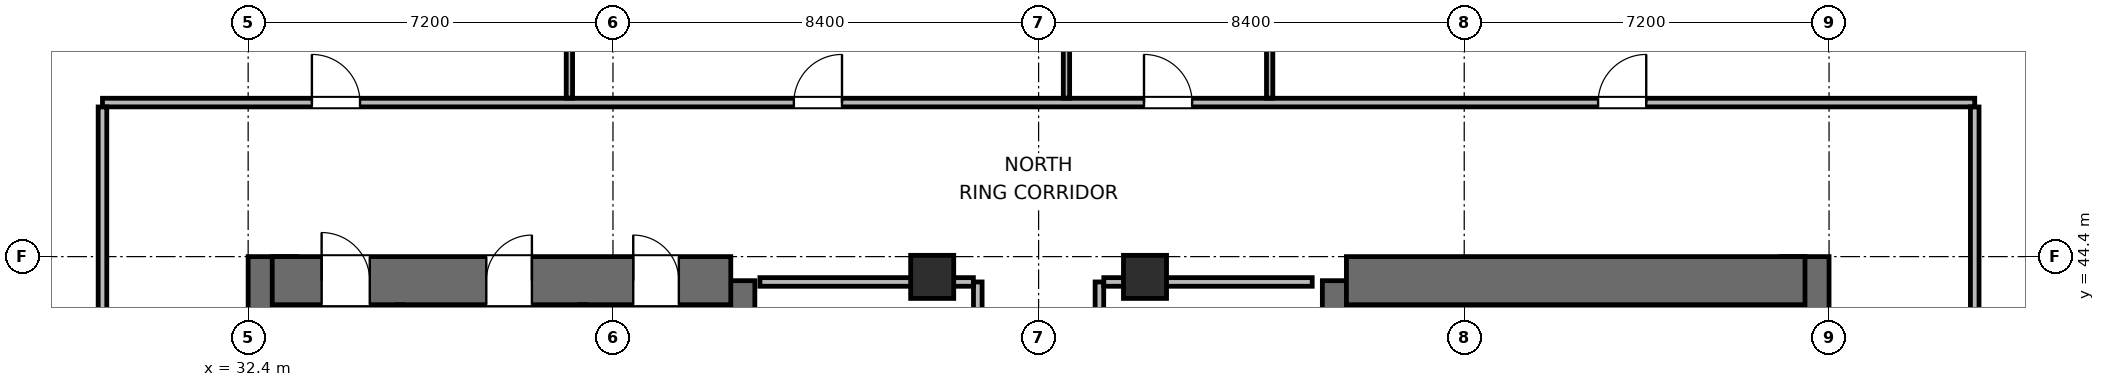
"""IFC4 building model, lengths in metres.
Left out: names, types, materials, properties, quantities, classifications, styles, units other than length and angle.
Written with IfcOpenShell. Run it as: python <this file> out.ifc"""

import sys

from ifc_helpers import new_model, si_unit, direction, frame, frame_2d, origin, origin_2d, place, context, subcontext, project, spatial, rectangle, extrude, element, fill, save


model = new_model("IFC4")
c1 = context("Model", 3, precision=1e-05, world=origin(), true_north=direction((0.0, 1.0)))
c2 = subcontext(c1, "Body", "Model", "MODEL_VIEW")
j1 = project(units=[si_unit("LENGTHUNIT", "METRE"), si_unit("PLANEANGLEUNIT", "RADIAN")], contexts=[c1])
p1 = place(None, origin())
s1 = spatial("IfcSite", under=j1, at=p1, CompositionType="ELEMENT")
p2 = place(p1, origin())
s2 = spatial("IfcBuilding", under=s1, at=p2, CompositionType="ELEMENT")
p3 = place(p2, frame((0.0, 0.0, 60.6)))
s3 = spatial("IfcBuildingStorey", under=s2, at=p3, CompositionType="ELEMENT", Elevation=60.6)
p4 = place(p3, frame((32.875, 27.6, 0.0), z_axis=(0.0, 0.0, 1.0), x_axis=(0.0, 1.0, 0.0)))
e1 = element("IfcWall", 1, at=p4, inside=s3, PredefinedType="SHEAR", context=c2, shape_type="SweptSolid", body=[
    extrude(rectangle(XDim=16.8, YDim=0.95, at=frame_2d((8.4, 0.0))), origin(), (0.0, 0.0, 1.0), 3.9),
])
p5 = place(p3, frame((41.925, 37.8, 0.0), z_axis=(0.0, 0.0, 1.0), x_axis=(0.0, 1.0, 0.0)))
e2 = element("IfcWall", 2, at=p5, inside=s3, PredefinedType="SHEAR", context=c2, shape_type="SweptSolid", body=[
    extrude(rectangle(XDim=6.125, YDim=0.95, at=frame_2d((3.062, 0.0))), origin(), (0.0, 0.0, 1.0), 3.9),
])
p6 = place(p3, frame((32.875, 43.925, 0.0), z_axis=(0.0, 0.0, 1.0), x_axis=(1.0, 0.0, 0.0)))
e3 = element("IfcWall", 3, at=p6, inside=s3, PredefinedType="SHEAR", context=c2, shape_type="SweptSolid", body=[
    extrude(rectangle(XDim=9.05, YDim=0.95, at=frame_2d((4.525, 0.0))), origin(), (0.0, 0.0, 1.0), 3.9),
])
p7 = place(p6, frame((0.975, 0.0, 0.0)))
e4 = element("IfcOpeningElement", 4, at=p7, cuts=e3, PredefinedType="OPENING", context=c2, shape_type="SweptSolid", body=[
    extrude(rectangle(XDim=0.95, YDim=2.04, at=frame_2d((0.475, 1.02))), frame((0.0, 0.485, 0.0), z_axis=(0.0, -1.0, 0.0), x_axis=(1.0, 0.0, 0.0)), (0.0, 0.0, 1.0), 0.97),
])
p8 = place(p6, frame((4.225, 0.0, 0.0)))
e5 = element("IfcOpeningElement", 5, at=p8, cuts=e3, PredefinedType="OPENING", context=c2, shape_type="SweptSolid", body=[
    extrude(rectangle(XDim=0.9, YDim=2.02, at=frame_2d((0.45, 1.01))), frame((0.0, 0.485, 0.0), z_axis=(0.0, -1.0, 0.0), x_axis=(1.0, 0.0, 0.0)), (0.0, 0.0, 1.0), 0.97),
])
p9 = place(p6, frame((7.125, 0.0, 0.0)))
e6 = element("IfcOpeningElement", 6, at=p9, cuts=e3, PredefinedType="OPENING", context=c2, shape_type="SweptSolid", body=[
    extrude(rectangle(XDim=0.9, YDim=2.02, at=frame_2d((0.45, 1.01))), frame((0.0, 0.485, 0.0), z_axis=(0.0, -1.0, 0.0), x_axis=(1.0, 0.0, 0.0)), (0.0, 0.0, 1.0), 0.97),
])
p10 = place(p3, frame((54.075, 38.0, 0.0), z_axis=(0.0, 0.0, 1.0), x_axis=(0.0, 1.0, 0.0)))
e7 = element("IfcWall", 7, at=p10, inside=s3, PredefinedType="SHEAR", context=c2, shape_type="SweptSolid", body=[
    extrude(rectangle(XDim=5.925, YDim=0.95, at=frame_2d((2.962, 0.0))), origin(), (0.0, 0.0, 1.0), 3.9),
])
p11 = place(p3, frame((63.125, 27.6, 0.0), z_axis=(0.0, 0.0, 1.0), x_axis=(0.0, 1.0, 0.0)))
e8 = element("IfcWall", 8, at=p11, inside=s3, PredefinedType="SHEAR", context=c2, shape_type="SweptSolid", body=[
    extrude(rectangle(XDim=16.8, YDim=0.95, at=frame_2d((8.4, 0.0))), origin(), (0.0, 0.0, 1.0), 3.9),
])
p12 = place(p3, frame((54.075, 43.925, 0.0), z_axis=(0.0, 0.0, 1.0), x_axis=(1.0, 0.0, 0.0)))
e9 = element("IfcWall", 9, at=p12, inside=s3, PredefinedType="SHEAR", context=c2, shape_type="SweptSolid", body=[
    extrude(rectangle(XDim=9.05, YDim=0.95, at=frame_2d((4.525, 0.0))), origin(), (0.0, 0.0, 1.0), 3.9),
])
for number, where, z_axis, x_axis in (
    (10, (45.9, 44.0, 0.0), (0.0, 0.0, 1.0), (1.0, 0.0, 0.0)),
    (11, (50.1, 44.0, 0.0), (0.0, 0.0, 1.0), (1.0, 0.0, 0.0)),
):
    element("IfcColumn", number, at=place(p3, frame(where, z_axis=z_axis, x_axis=x_axis)), inside=s3, PredefinedType="COLUMN", context=c2, shape_type="SweptSolid", body=[
        extrude(rectangle(XDim=0.85, YDim=0.85, at=origin_2d()), origin(), (0.0, 0.0, 1.0), 3.9),
    ])
for number, where, z_axis, x_axis in (
    (12, (35.4, 41.095, 0.0), (0.0, 0.0, 1.0), (0.0, 1.0, 0.0)),
    (13, (39.0, 41.095, 0.0), (0.0, 0.0, 1.0), (0.0, 1.0, 0.0)),
):
    element("IfcWall", number, at=place(p3, frame(where, z_axis=z_axis, x_axis=x_axis)), inside=s3, PredefinedType="PARTITIONING", context=c2, shape_type="SweptSolid", body=[
        extrude(rectangle(XDim=2.355, YDim=0.125, at=frame_2d((1.177, 0.0))), origin(), (0.0, 0.0, 1.0), 3.64),
    ])
p13 = place(p3, frame((46.8, 37.9, 0.0), z_axis=(0.0, 0.0, 1.0), x_axis=(0.0, 1.0, 0.0)))
e14 = element("IfcWall", 14, at=p13, inside=s3, PredefinedType="PARTITIONING", context=c2, shape_type="SweptSolid", body=[
    extrude(rectangle(XDim=6.0, YDim=0.17, at=frame_2d((3.0, 0.0))), origin(), (0.0, 0.0, 1.0), 3.64),
])
p14 = place(p13, frame((0.69, 0.0, 0.0)))
e15 = element("IfcOpeningElement", 15, at=p14, cuts=e14, PredefinedType="OPENING", context=c2, shape_type="SweptSolid", body=[
    extrude(rectangle(XDim=0.9, YDim=2.02, at=frame_2d((0.45, 1.01))), frame((0.0, 0.095, 0.0), z_axis=(0.0, -1.0, 0.0), x_axis=(1.0, 0.0, 0.0)), (0.0, 0.0, 1.0), 0.19),
])
p15 = place(p13, frame((3.69, 0.0, 0.0)))
e16 = element("IfcOpeningElement", 16, at=p15, cuts=e14, PredefinedType="OPENING", context=c2, shape_type="SweptSolid", body=[
    extrude(rectangle(XDim=0.9, YDim=2.02, at=frame_2d((0.45, 1.01))), frame((0.0, 0.095, 0.0), z_axis=(0.0, -1.0, 0.0), x_axis=(1.0, 0.0, 0.0)), (0.0, 0.0, 1.0), 0.19),
])
p16 = place(p3, frame((42.5, 43.9, 0.0), z_axis=(0.0, 0.0, 1.0), x_axis=(1.0, 0.0, 0.0)))
e17 = element("IfcWall", 17, at=p16, inside=s3, PredefinedType="PARTITIONING", context=c2, shape_type="SweptSolid", body=[
    extrude(rectangle(XDim=4.213, YDim=0.17, at=frame_2d((2.106, 0.0))), origin(), (0.0, 0.0, 1.0), 2.525),
])
p17 = place(p3, frame((49.2, 37.9, 0.0), z_axis=(0.0, 0.0, 1.0), x_axis=(0.0, 1.0, 0.0)))
e18 = element("IfcWall", 18, at=p17, inside=s3, PredefinedType="PARTITIONING", context=c2, shape_type="SweptSolid", body=[
    extrude(rectangle(XDim=6.0, YDim=0.17, at=frame_2d((3.0, 0.0))), origin(), (0.0, 0.0, 1.0), 3.64),
])
p18 = place(p17, frame((0.54, 0.0, 0.0)))
e19 = element("IfcOpeningElement", 19, at=p18, cuts=e18, PredefinedType="OPENING", context=c2, shape_type="SweptSolid", body=[
    extrude(rectangle(XDim=0.9, YDim=2.02, at=frame_2d((0.45, 1.01))), frame((0.0, 0.095, 0.0), z_axis=(0.0, -1.0, 0.0), x_axis=(1.0, 0.0, 0.0)), (0.0, 0.0, 1.0), 0.19),
])
p19 = place(p17, frame((2.55, 0.0, 0.0)))
e20 = element("IfcOpeningElement", 20, at=p19, cuts=e18, PredefinedType="OPENING", context=c2, shape_type="SweptSolid", body=[
    extrude(rectangle(XDim=0.9, YDim=2.02, at=frame_2d((0.45, 1.01))), frame((0.0, 0.095, 0.0), z_axis=(0.0, -1.0, 0.0), x_axis=(1.0, 0.0, 0.0)), (0.0, 0.0, 1.0), 0.19),
])
p20 = place(p17, frame((4.56, 0.0, 0.0)))
e21 = element("IfcOpeningElement", 21, at=p20, cuts=e18, PredefinedType="OPENING", context=c2, shape_type="SweptSolid", body=[
    extrude(rectangle(XDim=0.9, YDim=2.02, at=frame_2d((0.45, 1.01))), frame((0.0, 0.095, 0.0), z_axis=(0.0, -1.0, 0.0), x_axis=(1.0, 0.0, 0.0)), (0.0, 0.0, 1.0), 0.19),
])
p21 = place(p3, frame((49.287, 43.9, 0.0), z_axis=(0.0, 0.0, 1.0), x_axis=(1.0, 0.0, 0.0)))
e22 = element("IfcWall", 22, at=p21, inside=s3, PredefinedType="PARTITIONING", context=c2, shape_type="SweptSolid", body=[
    extrude(rectangle(XDim=4.113, YDim=0.17, at=frame_2d((2.056, 0.0))), origin(), (0.0, 0.0, 1.0), 2.525),
])
p22 = place(p3, frame((29.525, 47.44, 0.0), z_axis=(0.0, 0.0, 1.0), x_axis=(1.0, 0.0, 0.0)))
e23 = element("IfcWall", 23, at=p22, inside=s3, PredefinedType="PARTITIONING", context=c2, shape_type="SweptSolid", body=[
    extrude(rectangle(XDim=36.95, YDim=0.17, at=frame_2d((18.475, 0.0))), origin(), (0.0, 0.0, 1.0), 3.64),
])
p23 = place(p22, frame((4.133, 0.0, 0.0)))
e24 = element("IfcOpeningElement", 24, at=p23, cuts=e23, PredefinedType="OPENING", context=c2, shape_type="SweptSolid", body=[
    extrude(rectangle(XDim=0.95, YDim=2.04, at=frame_2d((0.475, 1.02))), frame((0.0, 0.095, 0.0), z_axis=(0.0, -1.0, 0.0), x_axis=(1.0, 0.0, 0.0)), (0.0, 0.0, 1.0), 0.19),
])
p24 = place(p22, frame((13.645, 0.0, 0.0)))
e25 = element("IfcOpeningElement", 25, at=p24, cuts=e23, PredefinedType="OPENING", context=c2, shape_type="SweptSolid", body=[
    extrude(rectangle(XDim=0.95, YDim=2.04, at=frame_2d((0.475, 1.02))), frame((0.0, 0.095, 0.0), z_axis=(0.0, -1.0, 0.0), x_axis=(1.0, 0.0, 0.0)), (0.0, 0.0, 1.0), 0.19),
])
p25 = place(p22, frame((20.555, 0.0, 0.0)))
e26 = element("IfcOpeningElement", 26, at=p25, cuts=e23, PredefinedType="OPENING", context=c2, shape_type="SweptSolid", body=[
    extrude(rectangle(XDim=0.95, YDim=2.04, at=frame_2d((0.475, 1.02))), frame((0.0, 0.095, 0.0), z_axis=(0.0, -1.0, 0.0), x_axis=(1.0, 0.0, 0.0)), (0.0, 0.0, 1.0), 0.19),
])
p26 = place(p22, frame((29.517, 0.0, 0.0)))
e27 = element("IfcOpeningElement", 27, at=p26, cuts=e23, PredefinedType="OPENING", context=c2, shape_type="SweptSolid", body=[
    extrude(rectangle(XDim=0.95, YDim=2.04, at=frame_2d((0.475, 1.02))), frame((0.0, 0.095, 0.0), z_axis=(0.0, -1.0, 0.0), x_axis=(1.0, 0.0, 0.0)), (0.0, 0.0, 1.0), 0.19),
])
p27 = place(p3, frame((29.525, 24.647, 0.0), z_axis=(0.0, 0.0, 1.0), x_axis=(0.0, 1.0, 0.0)))
e28 = element("IfcWall", 28, at=p27, inside=s3, PredefinedType="PARTITIONING", context=c2, shape_type="SweptSolid", body=[
    extrude(rectangle(XDim=22.706, YDim=0.17, at=frame_2d((11.353, 0.0))), origin(), (0.0, 0.0, 1.0), 3.64),
])
p28 = place(p27, frame((4.758, 0.0, 0.0)))
e29 = element("IfcOpeningElement", 29, at=p28, cuts=e28, PredefinedType="OPENING", context=c2, shape_type="SweptSolid", body=[
    extrude(rectangle(XDim=0.95, YDim=2.04, at=frame_2d((0.475, 1.02))), frame((0.0, 0.095, 0.0), z_axis=(0.0, -1.0, 0.0), x_axis=(1.0, 0.0, 0.0)), (0.0, 0.0, 1.0), 0.19),
])
p29 = place(p27, frame((16.198, 0.0, 0.0)))
e30 = element("IfcOpeningElement", 30, at=p29, cuts=e28, PredefinedType="OPENING", context=c2, shape_type="SweptSolid", body=[
    extrude(rectangle(XDim=0.95, YDim=2.04, at=frame_2d((0.475, 1.02))), frame((0.0, 0.095, 0.0), z_axis=(0.0, -1.0, 0.0), x_axis=(1.0, 0.0, 0.0)), (0.0, 0.0, 1.0), 0.19),
])
p30 = place(p3, frame((66.475, 24.647, 0.0), z_axis=(0.0, 0.0, 1.0), x_axis=(0.0, 1.0, 0.0)))
e31 = element("IfcWall", 31, at=p30, inside=s3, PredefinedType="PARTITIONING", context=c2, shape_type="SweptSolid", body=[
    extrude(rectangle(XDim=22.706, YDim=0.17, at=frame_2d((11.353, 0.0))), origin(), (0.0, 0.0, 1.0), 3.64),
])
p31 = place(p30, frame((5.758, 0.0, 0.0)))
e32 = element("IfcOpeningElement", 32, at=p31, cuts=e31, PredefinedType="OPENING", context=c2, shape_type="SweptSolid", body=[
    extrude(rectangle(XDim=0.95, YDim=2.04, at=frame_2d((0.475, 1.02))), frame((0.0, 0.095, 0.0), z_axis=(0.0, -1.0, 0.0), x_axis=(1.0, 0.0, 0.0)), (0.0, 0.0, 1.0), 0.19),
])
p32 = place(p30, frame((17.198, 0.0, 0.0)))
e33 = element("IfcOpeningElement", 33, at=p32, cuts=e31, PredefinedType="OPENING", context=c2, shape_type="SweptSolid", body=[
    extrude(rectangle(XDim=0.95, YDim=2.04, at=frame_2d((0.475, 1.02))), frame((0.0, 0.095, 0.0), z_axis=(0.0, -1.0, 0.0), x_axis=(1.0, 0.0, 0.0)), (0.0, 0.0, 1.0), 0.19),
])
p33 = place(p3, frame((38.74, 47.527, 0.0), z_axis=(0.0, 0.0, 1.0), x_axis=(0.0, 1.0, 0.0)))
e34 = element("IfcWall", 34, at=p33, inside=s3, PredefinedType="PARTITIONING", context=c2, shape_type="SweptSolid", body=[
    extrude(rectangle(XDim=14.628, YDim=0.125, at=frame_2d((7.314, 0.0))), origin(), (0.0, 0.0, 1.0), 3.64),
])
p34 = place(p3, frame((48.55, 47.527, 0.0), z_axis=(0.0, 0.0, 1.0), x_axis=(0.0, 1.0, 0.0)))
e35 = element("IfcWall", 35, at=p34, inside=s3, PredefinedType="PARTITIONING", context=c2, shape_type="SweptSolid", body=[
    extrude(rectangle(XDim=11.013, YDim=0.125, at=frame_2d((5.506, 0.0))), origin(), (0.0, 0.0, 1.0), 3.64),
])
p35 = place(p3, frame((52.56, 47.527, 0.0), z_axis=(0.0, 0.0, 1.0), x_axis=(0.0, 1.0, 0.0)))
e36 = element("IfcWall", 36, at=p35, inside=s3, PredefinedType="PARTITIONING", context=c2, shape_type="SweptSolid", body=[
    extrude(rectangle(XDim=10.898, YDim=0.125, at=frame_2d((5.449, 0.0))), origin(), (0.0, 0.0, 1.0), 3.003),
])
p36 = place(p7, origin())
e37 = element("IfcDoor", 37, at=p36, inside=s3, OperationType="SINGLE_SWING_LEFT", PredefinedType="DOOR", context=c2, shape_type="SweptSolid", body=[
    extrude(rectangle(XDim=0.95, YDim=2.04, at=frame_2d((0.475, 1.02))), frame((0.0, 0.025, 0.0), z_axis=(0.0, -1.0, 0.0), x_axis=(1.0, 0.0, 0.0)), (0.0, 0.0, 1.0), 0.05),
])
fill(e4, e37)
p37 = place(p8, origin())
e38 = element("IfcDoor", 38, at=p37, inside=s3, OperationType="SINGLE_SWING_RIGHT", PredefinedType="DOOR", context=c2, shape_type="SweptSolid", body=[
    extrude(rectangle(XDim=0.9, YDim=2.02, at=frame_2d((0.45, 1.01))), frame((0.0, 0.025, 0.0), z_axis=(0.0, -1.0, 0.0), x_axis=(1.0, 0.0, 0.0)), (0.0, 0.0, 1.0), 0.05),
])
fill(e5, e38)
p38 = place(p9, origin())
e39 = element("IfcDoor", 39, at=p38, inside=s3, OperationType="SINGLE_SWING_LEFT", PredefinedType="DOOR", context=c2, shape_type="SweptSolid", body=[
    extrude(rectangle(XDim=0.9, YDim=2.02, at=frame_2d((0.45, 1.01))), frame((0.0, 0.025, 0.0), z_axis=(0.0, -1.0, 0.0), x_axis=(1.0, 0.0, 0.0)), (0.0, 0.0, 1.0), 0.05),
])
fill(e6, e39)
p39 = place(p23, origin())
e40 = element("IfcDoor", 40, at=p39, inside=s3, OperationType="SINGLE_SWING_LEFT", PredefinedType="DOOR", context=c2, shape_type="SweptSolid", body=[
    extrude(rectangle(XDim=0.95, YDim=2.04, at=frame_2d((0.475, 1.02))), frame((0.0, 0.025, 0.0), z_axis=(0.0, -1.0, 0.0), x_axis=(1.0, 0.0, 0.0)), (0.0, 0.0, 1.0), 0.05),
])
fill(e24, e40)
p40 = place(p24, origin())
e41 = element("IfcDoor", 41, at=p40, inside=s3, OperationType="SINGLE_SWING_RIGHT", PredefinedType="DOOR", context=c2, shape_type="SweptSolid", body=[
    extrude(rectangle(XDim=0.95, YDim=2.04, at=frame_2d((0.475, 1.02))), frame((0.0, 0.025, 0.0), z_axis=(0.0, -1.0, 0.0), x_axis=(1.0, 0.0, 0.0)), (0.0, 0.0, 1.0), 0.05),
])
fill(e25, e41)
p41 = place(p25, origin())
e42 = element("IfcDoor", 42, at=p41, inside=s3, OperationType="SINGLE_SWING_LEFT", PredefinedType="DOOR", context=c2, shape_type="SweptSolid", body=[
    extrude(rectangle(XDim=0.95, YDim=2.04, at=frame_2d((0.475, 1.02))), frame((0.0, 0.025, 0.0), z_axis=(0.0, -1.0, 0.0), x_axis=(1.0, 0.0, 0.0)), (0.0, 0.0, 1.0), 0.05),
])
fill(e26, e42)
p42 = place(p26, origin())
e43 = element("IfcDoor", 43, at=p42, inside=s3, OperationType="SINGLE_SWING_RIGHT", PredefinedType="DOOR", context=c2, shape_type="SweptSolid", body=[
    extrude(rectangle(XDim=0.95, YDim=2.04, at=frame_2d((0.475, 1.02))), frame((0.0, 0.025, 0.0), z_axis=(0.0, -1.0, 0.0), x_axis=(1.0, 0.0, 0.0)), (0.0, 0.0, 1.0), 0.05),
])
fill(e27, e43)
save(model, sys.argv[1])
